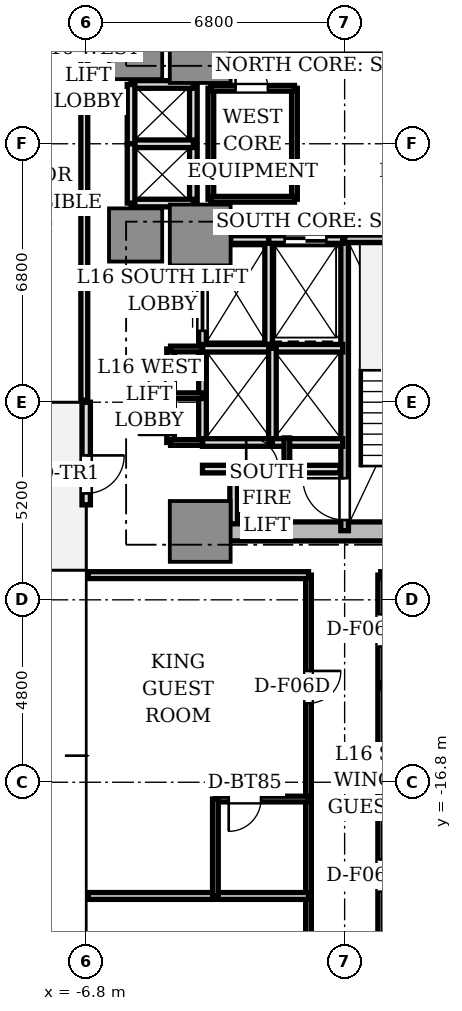
"""IFC4 building model, lengths in metres.
Left out: names, types, materials, properties, quantities, classifications, styles, units other than length and angle.
Written with IfcOpenShell. Run it as: python <this file> out.ifc"""

import sys

from ifc_helpers import new_model, si_unit, direction, frame, frame_2d, origin, origin_2d, place, context, subcontext, project, spatial, rectangle, extrude, source, transform, mapped, element, fill, save


model = new_model("IFC4")
c1 = context("Model", 3, precision=1e-05, world=origin(), true_north=direction((0.0, 1.0)))
c2 = subcontext(c1, "Body", "Model", "MODEL_VIEW")
j1 = project(units=[si_unit("LENGTHUNIT", "METRE"), si_unit("PLANEANGLEUNIT", "RADIAN")], contexts=[c1])
p1 = place(None, origin())
s1 = spatial("IfcSite", under=j1, at=p1, CompositionType="ELEMENT")
p2 = place(p1, origin())
s2 = spatial("IfcBuilding", under=s1, at=p2, CompositionType="ELEMENT")
p3 = place(p2, frame((0.0, 0.0, 61.1)))
s3 = spatial("IfcBuildingStorey", under=s2, at=p3, CompositionType="ELEMENT", Elevation=61.1)
p4 = place(p3, frame((-3.55, -10.2, 0.0), z_axis=(0.0, 0.0, 1.0), x_axis=(1.0, 0.0, 0.0)))
e1 = element("IfcWall", 1, at=p4, inside=s3, PredefinedType="SHEAR", context=c2, shape_type="SweptSolid", body=[
    extrude(rectangle(XDim=7.1, YDim=0.5, at=frame_2d((3.55, 0.0))), origin(), (0.0, 0.0, 1.0), 3.11),
])
m1 = source(origin(), c2, "Body", "SweptSolid", [
    extrude(rectangle(XDim=1.6, YDim=1.6, at=origin_2d()), origin(), (0.0, 0.0, 1.0), 3.11),
])
for number, where, z_axis, x_axis in (
    (2, (-3.8, 2.4, 0.0), (0.0, 0.0, 1.0), (1.0, 0.0, 0.0)),
    (3, (-3.8, -2.4, 0.0), (0.0, 0.0, 1.0), (1.0, 0.0, 0.0)),
    (4, (-3.8, -10.2, 0.0), (0.0, 0.0, 1.0), (1.0, 0.0, 0.0)),
):
    element("IfcColumn", number, at=place(p3, frame(where, z_axis=z_axis, x_axis=x_axis)), inside=s3, PredefinedType="COLUMN", context=c2, shape_type="MappedRepresentation", body=[
        mapped(m1, transform((0.0, 0.0, 0.0), scale=1.0)),
    ])
m2 = source(origin(), c2, "Body", "SweptSolid", [
    extrude(rectangle(XDim=1.4, YDim=1.4, at=origin_2d()), origin(), (0.0, 0.0, 1.0), 3.11),
])
for number, where, z_axis, x_axis in (
    (5, (-5.5, 2.4, 0.0), (0.0, 0.0, 1.0), (1.0, 0.0, 0.0)),
    (6, (-5.5, -2.4, 0.0), (0.0, 0.0, 1.0), (1.0, 0.0, 0.0)),
):
    element("IfcColumn", number, at=place(p3, frame(where, z_axis=z_axis, x_axis=x_axis)), inside=s3, PredefinedType="COLUMN", context=c2, shape_type="MappedRepresentation", body=[
        mapped(m2, transform((0.0, 0.0, 0.0), scale=1.0)),
    ])
p5 = place(p3, frame((-6.8, -6.8, 0.0), z_axis=(0.0, 0.0, 1.0), x_axis=(0.0, -1.0, 0.0)))
e7 = element("IfcWall", 7, at=p5, inside=s3, PredefinedType="STANDARD", context=c2, shape_type="SweptSolid", body=[
    extrude(rectangle(XDim=2.7, YDim=0.22, at=frame_2d((1.35, 0.0))), origin(), (0.0, 0.0, 1.0), 3.11),
])
p6 = place(p5, frame((1.4, 0.0, 0.0)))
e8 = element("IfcOpeningElement", 8, at=p6, cuts=e7, PredefinedType="OPENING", context=c2, shape_type="SweptSolid", body=[
    extrude(rectangle(XDim=1.0, YDim=2.2, at=frame_2d((0.5, 1.1))), frame((0.0, 0.12, 0.0), z_axis=(0.0, -1.0, 0.0), x_axis=(1.0, 0.0, 0.0)), (0.0, 0.0, 1.0), 0.24),
])
p7 = place(p3, frame((0.0, -10.18, 0.0), z_axis=(0.0, 0.0, 1.0), x_axis=(0.0, 1.0, 0.0)))
e9 = element("IfcWall", 9, at=p7, inside=s3, PredefinedType="SOLIDWALL", context=c2, shape_type="SweptSolid", body=[
    extrude(rectangle(XDim=7.68, YDim=0.2, at=frame_2d((3.84, 0.0))), origin(), (0.0, 0.0, 1.0), 3.11),
])
p8 = place(p7, frame((0.28, 0.0, 0.0)))
e10 = element("IfcOpeningElement", 10, at=p8, cuts=e9, PredefinedType="OPENING", context=c2, shape_type="SweptSolid", body=[
    extrude(rectangle(XDim=1.1, YDim=2.15, at=frame_2d((0.55, 1.075))), frame((0.0, 0.11, 0.0), z_axis=(0.0, -1.0, 0.0), x_axis=(1.0, 0.0, 0.0)), (0.0, 0.0, 1.0), 0.22),
])
p9 = place(p3, frame((0.0, -2.5, 0.0), z_axis=(0.0, 0.0, 1.0), x_axis=(1.0, 0.0, 0.0)))
e11 = element("IfcWall", 11, at=p9, inside=s3, PredefinedType="SOLIDWALL", context=c2, shape_type="SweptSolid", body=[
    extrude(rectangle(XDim=3.72, YDim=0.2, at=frame_2d((1.86, 0.0))), origin(), (0.0, 0.0, 1.0), 3.11),
])
p10 = place(p3, frame((-2.0, -5.28, 0.0), z_axis=(0.0, 0.0, 1.0), x_axis=(0.0, 1.0, 0.0)))
e12 = element("IfcWall", 12, at=p10, inside=s3, PredefinedType="SOLIDWALL", context=c2, shape_type="SweptSolid", body=[
    extrude(rectangle(XDim=2.78, YDim=0.2, at=frame_2d((1.39, 0.0))), origin(), (0.0, 0.0, 1.0), 2.66),
])
p11 = place(p3, frame((-2.0, -2.52, 0.0), z_axis=(0.0, 0.0, 1.0), x_axis=(1.0, 0.0, 0.0)))
e13 = element("IfcWall", 13, at=p11, inside=s3, PredefinedType="SOLIDWALL", context=c2, shape_type="SweptSolid", body=[
    extrude(rectangle(XDim=1.95, YDim=0.2, at=frame_2d((0.975, 0.0))), origin(), (0.0, 0.0, 1.0), 2.66),
])
p12 = place(p11, frame((0.42, 0.0, 0.0)))
e14 = element("IfcOpeningElement", 14, at=p12, cuts=e13, PredefinedType="OPENING", context=c2, shape_type="SweptSolid", body=[
    extrude(rectangle(XDim=1.1, YDim=2.2, at=frame_2d((0.55, 1.1))), frame((0.0, 0.11, 0.0), z_axis=(0.0, -1.0, 0.0), x_axis=(1.0, 0.0, 0.0)), (0.0, 0.0, 1.0), 0.22),
])
p13 = place(p3, frame((-3.0, -2.52, 0.0), z_axis=(0.0, 0.0, 1.0), x_axis=(1.0, 0.0, 0.0)))
e15 = element("IfcWall", 15, at=p13, inside=s3, PredefinedType="SOLIDWALL", context=c2, shape_type="SweptSolid", body=[
    extrude(rectangle(XDim=1.0, YDim=0.2, at=frame_2d((0.5, 0.0))), origin(), (0.0, 0.0, 1.0), 2.66),
])
p14 = place(p3, frame((-3.74, -5.36, 0.0), z_axis=(0.0, 0.0, 1.0), x_axis=(0.0, 1.0, 0.0)))
e16 = element("IfcWall", 16, at=p14, inside=s3, PredefinedType="SOLIDWALL", context=c2, shape_type="SweptSolid", body=[
    extrude(rectangle(XDim=2.08, YDim=0.2, at=frame_2d((1.04, 0.0))), origin(), (0.0, 0.0, 1.0), 2.66),
])
p15 = place(p14, frame((0.44, 0.0, 0.0)))
e17 = element("IfcOpeningElement", 17, at=p15, cuts=e16, PredefinedType="OPENING", context=c2, shape_type="SweptSolid", body=[
    extrude(rectangle(XDim=1.2, YDim=2.2, at=frame_2d((0.6, 1.1))), frame((0.0, 0.11, 0.0), z_axis=(0.0, -1.0, 0.0), x_axis=(1.0, 0.0, 0.0)), (0.0, 0.0, 1.0), 0.22),
])
p16 = place(p3, frame((-3.74, -7.86, 0.0), z_axis=(0.0, 0.0, 1.0), x_axis=(0.0, 1.0, 0.0)))
e18 = element("IfcWall", 18, at=p16, inside=s3, PredefinedType="SOLIDWALL", context=c2, shape_type="SweptSolid", body=[
    extrude(rectangle(XDim=2.48, YDim=0.2, at=frame_2d((1.24, 0.0))), origin(), (0.0, 0.0, 1.0), 2.66),
])
p17 = place(p3, frame((-3.74, -7.86, 0.0), z_axis=(0.0, 0.0, 1.0), x_axis=(1.0, 0.0, 0.0)))
e19 = element("IfcWall", 19, at=p17, inside=s3, PredefinedType="SOLIDWALL", context=c2, shape_type="SweptSolid", body=[
    extrude(rectangle(XDim=1.84, YDim=0.2, at=frame_2d((0.92, 0.0))), origin(), (0.0, 0.0, 1.0), 2.66),
])
p18 = place(p3, frame((-3.74, -5.38, 0.0), z_axis=(0.0, 0.0, 1.0), x_axis=(1.0, 0.0, 0.0)))
e20 = element("IfcWall", 20, at=p18, inside=s3, PredefinedType="SOLIDWALL", context=c2, shape_type="SweptSolid", body=[
    extrude(rectangle(XDim=3.69, YDim=0.2, at=frame_2d((1.845, 0.0))), origin(), (0.0, 0.0, 1.0), 2.66),
])
p19 = place(p3, frame((-1.9, -7.86, 0.0), z_axis=(0.0, 0.0, 1.0), x_axis=(0.0, 1.0, 0.0)))
e21 = element("IfcWall", 21, at=p19, inside=s3, PredefinedType="SOLIDWALL", context=c2, shape_type="SweptSolid", body=[
    extrude(rectangle(XDim=2.48, YDim=0.2, at=frame_2d((1.24, 0.0))), origin(), (0.0, 0.0, 1.0), 2.66),
])
p20 = place(p3, frame((-1.9, -7.86, 0.0), z_axis=(0.0, 0.0, 1.0), x_axis=(1.0, 0.0, 0.0)))
e22 = element("IfcWall", 22, at=p20, inside=s3, PredefinedType="SOLIDWALL", context=c2, shape_type="SweptSolid", body=[
    extrude(rectangle(XDim=1.85, YDim=0.2, at=frame_2d((0.925, 0.0))), origin(), (0.0, 0.0, 1.0), 2.66),
])
p21 = place(p3, frame((-3.98, -1.56, 0.0), z_axis=(0.0, 0.0, 1.0), x_axis=(0.0, 1.0, 0.0)))
e23 = element("IfcWall", 23, at=p21, inside=s3, PredefinedType="SOLIDWALL", context=c2, shape_type="SweptSolid", body=[
    extrude(rectangle(XDim=3.12, YDim=0.2, at=frame_2d((1.56, 0.0))), origin(), (0.0, 0.0, 1.0), 2.18),
])
for number, where, z_axis, x_axis in (
    (24, (-5.62, 1.56, 0.0), (0.0, 0.0, 1.0), (1.0, 0.0, 0.0)),
    (25, (-5.62, -1.56, 0.0), (0.0, 0.0, 1.0), (1.0, 0.0, 0.0)),
    (26, (-5.62, 0.0, 0.0), (0.0, 0.0, 1.0), (1.0, 0.0, 0.0)),
):
    element("IfcWall", number, at=place(p3, frame(where, z_axis=z_axis, x_axis=x_axis)), inside=s3, PredefinedType="SOLIDWALL", context=c2, shape_type="SweptSolid", body=[
        extrude(rectangle(XDim=1.64, YDim=0.2, at=frame_2d((0.82, 0.0))), origin(), (0.0, 0.0, 1.0), 2.66),
    ])
for number, where, z_axis, x_axis in (
    (27, (-5.62, 0.0, 0.0), (0.0, 0.0, 1.0), (0.0, 1.0, 0.0)),
    (28, (-5.62, -1.56, 0.0), (0.0, 0.0, 1.0), (0.0, 1.0, 0.0)),
):
    element("IfcWall", number, at=place(p3, frame(where, z_axis=z_axis, x_axis=x_axis)), inside=s3, PredefinedType="SOLIDWALL", context=c2, shape_type="SweptSolid", body=[
        extrude(rectangle(XDim=1.56, YDim=0.2, at=frame_2d((0.78, 0.0))), origin(), (0.0, 0.0, 1.0), 2.66),
    ])
p22 = place(p3, frame((-3.74, -8.56, 0.0), z_axis=(0.0, 0.0, 1.0), x_axis=(1.0, 0.0, 0.0)))
e29 = element("IfcWall", 29, at=p22, inside=s3, PredefinedType="SOLIDWALL", context=c2, shape_type="SweptSolid", body=[
    extrude(rectangle(XDim=3.62, YDim=0.2, at=frame_2d((1.81, 0.0))), origin(), (0.0, 0.0, 1.0), 2.66),
])
p23 = place(p22, frame((1.15, 0.0, 0.0)))
e30 = element("IfcOpeningElement", 30, at=p23, cuts=e29, PredefinedType="OPENING", context=c2, shape_type="SweptSolid", body=[
    extrude(rectangle(XDim=0.85, YDim=2.1, at=frame_2d((0.425, 1.05))), frame((0.0, 0.11, 0.0), z_axis=(0.0, -1.0, 0.0), x_axis=(1.0, 0.0, 0.0)), (0.0, 0.0, 1.0), 0.22),
])
p24 = place(p3, frame((-2.92, -10.0, 0.0), z_axis=(0.0, 0.0, 1.0), x_axis=(0.0, 1.0, 0.0)))
e31 = element("IfcWall", 31, at=p24, inside=s3, PredefinedType="SOLIDWALL", context=c2, shape_type="SweptSolid", body=[
    extrude(rectangle(XDim=1.44, YDim=0.2, at=frame_2d((0.72, 0.0))), origin(), (0.0, 0.0, 1.0), 2.66),
])
p25 = place(p3, frame((-1.52, -8.56, 0.0), z_axis=(0.0, 0.0, 1.0), x_axis=(0.0, 1.0, 0.0)))
e32 = element("IfcWall", 32, at=p25, inside=s3, PredefinedType="PARTITIONING", context=c2, shape_type="SweptSolid", body=[
    extrude(rectangle(XDim=0.82, YDim=0.15, at=frame_2d((0.41, 0.0))), origin(), (0.0, 0.0, 1.0), 2.66),
])
p26 = place(p3, frame((-4.58, -7.86, 0.0), z_axis=(0.0, 0.0, 1.0), x_axis=(0.0, 1.0, 0.0)))
e33 = element("IfcWall", 33, at=p26, inside=s3, PredefinedType="SOLIDWALL", context=c2, shape_type="SweptSolid", body=[
    extrude(rectangle(XDim=2.46, YDim=0.2, at=frame_2d((1.23, 0.0))), origin(), (0.0, 0.0, 1.0), 2.66),
])
p27 = place(p26, frame((0.2, 0.0, 0.0)))
e34 = element("IfcOpeningElement", 34, at=p27, cuts=e33, PredefinedType="OPENING", context=c2, shape_type="SweptSolid", body=[
    extrude(rectangle(XDim=0.85, YDim=2.1, at=frame_2d((0.425, 1.05))), frame((0.0, 0.11, 0.0), z_axis=(0.0, -1.0, 0.0), x_axis=(1.0, 0.0, 0.0)), (0.0, 0.0, 1.0), 0.22),
])
p28 = place(p26, frame((1.38, 0.0, 0.0)))
e35 = element("IfcOpeningElement", 35, at=p28, cuts=e33, PredefinedType="OPENING", context=c2, shape_type="SweptSolid", body=[
    extrude(rectangle(XDim=0.85, YDim=2.1, at=frame_2d((0.425, 1.05))), frame((0.0, 0.11, 0.0), z_axis=(0.0, -1.0, 0.0), x_axis=(1.0, 0.0, 0.0)), (0.0, 0.0, 1.0), 0.22),
])
for number, where, z_axis, x_axis in (
    (36, (-4.58, -5.4, 0.0), (0.0, 0.0, 1.0), (1.0, 0.0, 0.0)),
    (37, (-4.58, -7.86, 0.0), (0.0, 0.0, 1.0), (1.0, 0.0, 0.0)),
    (38, (-4.58, -6.63, 0.0), (0.0, 0.0, 1.0), (1.0, 0.0, 0.0)),
):
    element("IfcWall", number, at=place(p3, frame(where, z_axis=z_axis, x_axis=x_axis)), inside=s3, PredefinedType="PARTITIONING", context=c2, shape_type="SweptSolid", body=[
        extrude(rectangle(XDim=0.84, YDim=0.15, at=frame_2d((0.42, 0.0))), origin(), (0.0, 0.0, 1.0), 2.66),
    ])
p29 = place(p3, frame((-1.32, -1.46, 0.0), z_axis=(0.0, 0.0, 1.0), x_axis=(0.0, 1.0, 0.0)))
e39 = element("IfcWall", 39, at=p29, inside=s3, PredefinedType="PARTITIONING", context=c2, shape_type="SweptSolid", body=[
    extrude(rectangle(XDim=2.92, YDim=0.15, at=frame_2d((1.46, 0.0))), origin(), (0.0, 0.0, 1.0), 2.66),
])
p30 = place(p3, frame((-3.52, -1.46, 0.0), z_axis=(0.0, 0.0, 1.0), x_axis=(0.0, 1.0, 0.0)))
e40 = element("IfcWall", 40, at=p30, inside=s3, PredefinedType="PARTITIONING", context=c2, shape_type="SweptSolid", body=[
    extrude(rectangle(XDim=2.92, YDim=0.15, at=frame_2d((1.46, 0.0))), origin(), (0.0, 0.0, 1.0), 2.18),
])
p31 = place(p3, frame((-3.52, 1.46, 0.0), z_axis=(0.0, 0.0, 1.0), x_axis=(1.0, 0.0, 0.0)))
e41 = element("IfcWall", 41, at=p31, inside=s3, PredefinedType="PARTITIONING", context=c2, shape_type="SweptSolid", body=[
    extrude(rectangle(XDim=2.2, YDim=0.15, at=frame_2d((1.1, 0.0))), origin(), (0.0, 0.0, 1.0), 2.66),
])
p32 = place(p31, frame((0.65, 0.0, 0.0)))
e42 = element("IfcOpeningElement", 42, at=p32, cuts=e41, PredefinedType="OPENING", context=c2, shape_type="SweptSolid", body=[
    extrude(rectangle(XDim=0.85, YDim=2.1, at=frame_2d((0.425, 1.05))), frame((0.0, 0.085, 0.0), z_axis=(0.0, -1.0, 0.0), x_axis=(1.0, 0.0, 0.0)), (0.0, 0.0, 1.0), 0.17),
])
p33 = place(p3, frame((-3.52, -1.46, 0.0), z_axis=(0.0, 0.0, 1.0), x_axis=(1.0, 0.0, 0.0)))
e43 = element("IfcWall", 43, at=p33, inside=s3, PredefinedType="PARTITIONING", context=c2, shape_type="SweptSolid", body=[
    extrude(rectangle(XDim=2.2, YDim=0.15, at=frame_2d((1.1, 0.0))), origin(), (0.0, 0.0, 1.0), 2.66),
])
p34 = place(p3, frame((-6.85, 4.55, 0.0), z_axis=(0.0, 0.0, 1.0), x_axis=(0.0, -1.0, 0.0)))
e44 = element("IfcWall", 44, at=p34, inside=s3, PredefinedType="PARTITIONING", context=c2, shape_type="SweptSolid", body=[
    extrude(rectangle(XDim=11.3, YDim=0.18, at=frame_2d((5.65, 0.0))), origin(), (0.0, 0.0, 1.0), 2.66),
])
p35 = place(p3, frame((0.95, -11.35, 0.0), z_axis=(0.0, 0.0, 1.0), x_axis=(0.0, -1.0, 0.0)))
e45 = element("IfcWall", 45, at=p35, inside=s3, PredefinedType="PARTITIONING", context=c2, shape_type="SweptSolid", body=[
    extrude(rectangle(XDim=13.4, YDim=0.15, at=frame_2d((6.7, 0.0))), origin(), (0.0, 0.0, 1.0), 2.66),
])
p36 = place(p35, frame((1.029, 0.0, 0.0)))
e46 = element("IfcOpeningElement", 46, at=p36, cuts=e45, PredefinedType="OPENING", context=c2, shape_type="SweptSolid", body=[
    extrude(rectangle(XDim=0.85, YDim=2.1, at=frame_2d((0.425, 1.05))), frame((0.0, 0.085, 0.0), z_axis=(0.0, -1.0, 0.0), x_axis=(1.0, 0.0, 0.0)), (0.0, 0.0, 1.0), 0.17),
])
p37 = place(p35, frame((7.479, 0.0, 0.0)))
e47 = element("IfcOpeningElement", 47, at=p37, cuts=e45, PredefinedType="OPENING", context=c2, shape_type="SweptSolid", body=[
    extrude(rectangle(XDim=0.85, YDim=2.1, at=frame_2d((0.425, 1.05))), frame((0.0, 0.085, 0.0), z_axis=(0.0, -1.0, 0.0), x_axis=(1.0, 0.0, 0.0)), (0.0, 0.0, 1.0), 0.17),
])
p38 = place(p3, frame((-0.95, -11.35, 0.0), z_axis=(0.0, 0.0, 1.0), x_axis=(0.0, -1.0, 0.0)))
e48 = element("IfcWall", 48, at=p38, inside=s3, PredefinedType="PARTITIONING", context=c2, shape_type="SweptSolid", body=[
    extrude(rectangle(XDim=13.4, YDim=0.15, at=frame_2d((6.7, 0.0))), origin(), (0.0, 0.0, 1.0), 2.66),
])
p39 = place(p38, frame((2.521, 0.0, 0.0)))
e49 = element("IfcOpeningElement", 49, at=p39, cuts=e48, PredefinedType="OPENING", context=c2, shape_type="SweptSolid", body=[
    extrude(rectangle(XDim=0.85, YDim=2.1, at=frame_2d((0.425, 1.05))), frame((0.0, 0.085, 0.0), z_axis=(0.0, -1.0, 0.0), x_axis=(1.0, 0.0, 0.0)), (0.0, 0.0, 1.0), 0.17),
])
p40 = place(p38, frame((9.471, 0.0, 0.0)))
e50 = element("IfcOpeningElement", 50, at=p40, cuts=e48, PredefinedType="OPENING", context=c2, shape_type="SweptSolid", body=[
    extrude(rectangle(XDim=0.85, YDim=2.1, at=frame_2d((0.425, 1.05))), frame((0.0, 0.085, 0.0), z_axis=(0.0, -1.0, 0.0), x_axis=(1.0, 0.0, 0.0)), (0.0, 0.0, 1.0), 0.17),
])
for number, where, z_axis, x_axis in (
    (51, (0.95, -11.35, 0.0), (0.0, 0.0, 1.0), (1.0, 0.0, 0.0)),
    (52, (-6.75, -11.35, 0.0), (0.0, 0.0, 1.0), (1.0, 0.0, 0.0)),
    (53, (0.95, -16.308, 0.0), (0.0, 0.0, 1.0), (1.0, 0.0, 0.0)),
):
    element("IfcWall", number, at=place(p3, frame(where, z_axis=z_axis, x_axis=x_axis)), inside=s3, PredefinedType="PARTITIONING", context=c2, shape_type="SweptSolid", body=[
        extrude(rectangle(XDim=5.8, YDim=0.18, at=frame_2d((2.9, 0.0))), origin(), (0.0, 0.0, 1.0), 2.66),
    ])
p41 = place(p3, frame((0.95, -14.258, 0.0), z_axis=(0.0, 0.0, 1.0), x_axis=(1.0, 0.0, 0.0)))
e54 = element("IfcWall", 54, at=p41, inside=s3, PredefinedType="PARTITIONING", context=c2, shape_type="SweptSolid", body=[
    extrude(rectangle(XDim=2.45, YDim=0.15, at=frame_2d((1.225, 0.0))), origin(), (0.0, 0.0, 1.0), 2.66),
])
p42 = place(p41, frame((1.25, 0.0, 0.0)))
e55 = element("IfcOpeningElement", 55, at=p42, cuts=e54, PredefinedType="OPENING", context=c2, shape_type="SweptSolid", body=[
    extrude(rectangle(XDim=0.85, YDim=2.1, at=frame_2d((0.425, 1.05))), frame((0.0, 0.085, 0.0), z_axis=(0.0, -1.0, 0.0), x_axis=(1.0, 0.0, 0.0)), (0.0, 0.0, 1.0), 0.17),
])
p43 = place(p3, frame((-0.95, -19.792, 0.0), z_axis=(0.0, 0.0, 1.0), x_axis=(-1.0, 0.0, 0.0)))
e56 = element("IfcWall", 56, at=p43, inside=s3, PredefinedType="PARTITIONING", context=c2, shape_type="SweptSolid", body=[
    extrude(rectangle(XDim=5.8, YDim=0.18, at=frame_2d((2.9, 0.0))), origin(), (0.0, 0.0, 1.0), 2.66),
])
p44 = place(p3, frame((-0.95, -17.242, 0.0), z_axis=(0.0, 0.0, 1.0), x_axis=(-1.0, 0.0, 0.0)))
e57 = element("IfcWall", 57, at=p44, inside=s3, PredefinedType="PARTITIONING", context=c2, shape_type="SweptSolid", body=[
    extrude(rectangle(XDim=2.45, YDim=0.15, at=frame_2d((1.225, 0.0))), origin(), (0.0, 0.0, 1.0), 2.66),
])
p45 = place(p44, frame((1.25, 0.0, 0.0)))
e58 = element("IfcOpeningElement", 58, at=p45, cuts=e57, PredefinedType="OPENING", context=c2, shape_type="SweptSolid", body=[
    extrude(rectangle(XDim=0.85, YDim=2.1, at=frame_2d((0.425, 1.05))), frame((0.0, 0.085, 0.0), z_axis=(0.0, -1.0, 0.0), x_axis=(1.0, 0.0, 0.0)), (0.0, 0.0, 1.0), 0.17),
])
p46 = place(p3, frame((-3.4, -17.242, 0.0), z_axis=(0.0, 0.0, 1.0), x_axis=(0.0, -1.0, 0.0)))
e59 = element("IfcWall", 59, at=p46, inside=s3, PredefinedType="PARTITIONING", context=c2, shape_type="SweptSolid", body=[
    extrude(rectangle(XDim=2.55, YDim=0.15, at=frame_2d((1.275, 0.0))), origin(), (0.0, 0.0, 1.0), 2.66),
])
m3 = source(origin(), c2, "Body", "SweptSolid", [
    extrude(rectangle(XDim=1.0, YDim=0.05, at=origin_2d()), origin(), (0.0, 0.0, 1.0), 2.2),
])
p47 = place(p6, frame((0.5, 0.0, 0.0)))
e60 = element("IfcDoor", 60, at=p47, inside=s3, OperationType="SINGLE_SWING_LEFT", PredefinedType="DOOR", context=c2, shape_type="MappedRepresentation", body=[
    mapped(m3, transform((0.0, 0.0, 0.0), scale=1.0)),
])
fill(e8, e60)
m4 = source(origin(), c2, "Body", "SweptSolid", [
    extrude(rectangle(XDim=1.1, YDim=0.05, at=origin_2d()), origin(), (0.0, 0.0, 1.0), 2.2),
])
p48 = place(p12, frame((0.55, 0.0, 0.0)))
e61 = element("IfcDoor", 61, at=p48, inside=s3, OperationType="DOUBLE_DOOR_SLIDING", PredefinedType="DOOR", context=c2, shape_type="MappedRepresentation", body=[
    mapped(m4, transform((0.0, 0.0, 0.0), scale=1.0)),
])
fill(e14, e61)
m5 = source(origin(), c2, "Body", "SweptSolid", [
    extrude(rectangle(XDim=1.2, YDim=0.05, at=origin_2d()), origin(), (0.0, 0.0, 1.0), 2.2),
])
p49 = place(p15, frame((0.6, 0.0, 0.0)))
e62 = element("IfcDoor", 62, at=p49, inside=s3, OperationType="DOUBLE_DOOR_SLIDING", PredefinedType="DOOR", context=c2, shape_type="MappedRepresentation", body=[
    mapped(m5, transform((0.0, 0.0, 0.0), scale=1.0)),
])
fill(e17, e62)
m6 = source(origin(), c2, "Body", "SweptSolid", [
    extrude(rectangle(XDim=1.1, YDim=0.05, at=origin_2d()), origin(), (0.0, 0.0, 1.0), 2.15),
])
p50 = place(p8, frame((0.55, 0.0, 0.0)))
e63 = element("IfcDoor", 63, at=p50, inside=s3, OperationType="SINGLE_SWING_RIGHT", PredefinedType="DOOR", context=c2, shape_type="MappedRepresentation", body=[
    mapped(m6, transform((0.0, 0.0, 0.0), scale=1.0)),
])
fill(e10, e63)
m7 = source(origin(), c2, "Body", "SweptSolid", [
    extrude(rectangle(XDim=0.85, YDim=0.05, at=origin_2d()), origin(), (0.0, 0.0, 1.0), 2.1),
])
p51 = place(p23, frame((0.425, 0.0, 0.0)))
e64 = element("IfcDoor", 64, at=p51, inside=s3, OperationType="SINGLE_SWING_LEFT", PredefinedType="DOOR", context=c2, shape_type="MappedRepresentation", body=[
    mapped(m7, transform((0.0, 0.0, 0.0), scale=1.0)),
])
fill(e30, e64)
p52 = place(p27, frame((0.425, 0.0, 0.0)))
e65 = element("IfcDoor", 65, at=p52, inside=s3, OperationType="SINGLE_SWING_LEFT", PredefinedType="DOOR", context=c2, shape_type="MappedRepresentation", body=[
    mapped(m7, transform((0.0, 0.0, 0.0), scale=1.0)),
])
fill(e34, e65)
p53 = place(p28, frame((0.425, 0.0, 0.0)))
e66 = element("IfcDoor", 66, at=p53, inside=s3, OperationType="SINGLE_SWING_RIGHT", PredefinedType="DOOR", context=c2, shape_type="MappedRepresentation", body=[
    mapped(m7, transform((0.0, 0.0, 0.0), scale=1.0)),
])
fill(e35, e66)
p54 = place(p32, frame((0.425, 0.0, 0.0)))
e67 = element("IfcDoor", 67, at=p54, inside=s3, OperationType="SINGLE_SWING_LEFT", PredefinedType="DOOR", context=c2, shape_type="MappedRepresentation", body=[
    mapped(m7, transform((0.0, 0.0, 0.0), scale=1.0)),
])
fill(e42, e67)
p55 = place(p36, frame((0.425, 0.0, 0.0)))
e68 = element("IfcDoor", 68, at=p55, inside=s3, OperationType="SINGLE_SWING_LEFT", PredefinedType="DOOR", context=c2, shape_type="MappedRepresentation", body=[
    mapped(m7, transform((0.0, 0.0, 0.0), scale=1.0)),
])
fill(e46, e68)
p56 = place(p37, frame((0.425, 0.0, 0.0)))
e69 = element("IfcDoor", 69, at=p56, inside=s3, OperationType="SINGLE_SWING_LEFT", PredefinedType="DOOR", context=c2, shape_type="MappedRepresentation", body=[
    mapped(m7, transform((0.0, 0.0, 0.0), scale=1.0)),
])
fill(e47, e69)
p57 = place(p45, frame((0.425, 0.0, 0.0)))
e70 = element("IfcDoor", 70, at=p57, inside=s3, OperationType="SINGLE_SWING_RIGHT", PredefinedType="DOOR", context=c2, shape_type="MappedRepresentation", body=[
    mapped(m7, transform((0.0, 0.0, 0.0), scale=1.0)),
])
fill(e58, e70)
p58 = place(p39, frame((0.425, 0.0, 0.0)))
e71 = element("IfcDoor", 71, at=p58, inside=s3, OperationType="SINGLE_SWING_LEFT", PredefinedType="DOOR", context=c2, shape_type="MappedRepresentation", body=[
    mapped(m7, transform((0.0, 0.0, 0.0), scale=1.0)),
])
fill(e49, e71)
save(model, sys.argv[1])
